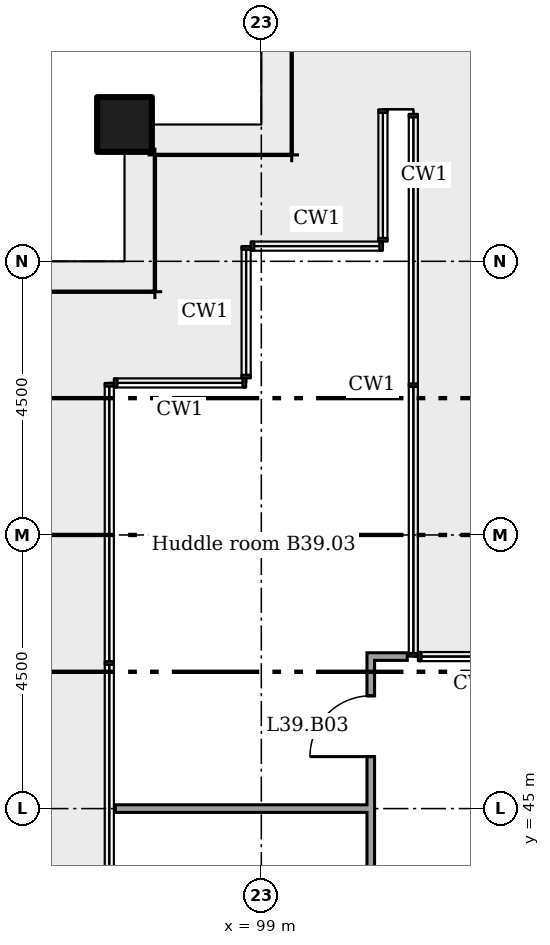
"""IFC4 building model, lengths in metres.
Left out: names, types, materials, properties, quantities, classifications, styles, units other than length and angle.
Written with IfcOpenShell. Run it as: python <this file> out.ifc"""

import sys

from ifc_helpers import new_model, si_unit, direction, frame, frame_2d, origin, origin_2d, place, context, subcontext, project, spatial, rectangle, extrude, element, fill, save


model = new_model("IFC4")
c1 = context("Model", 3, precision=1e-05, world=origin(), true_north=direction((0.0, 1.0)))
c2 = subcontext(c1, "Body", "Model", "MODEL_VIEW")
j1 = project(units=[si_unit("LENGTHUNIT", "METRE"), si_unit("PLANEANGLEUNIT", "RADIAN")], contexts=[c1])
p1 = place(None, origin())
s1 = spatial("IfcSite", under=j1, at=p1, CompositionType="ELEMENT")
p2 = place(p1, origin())
s2 = spatial("IfcBuilding", under=s1, at=p2, CompositionType="ELEMENT")
p3 = place(p2, frame((0.0, 0.0, 158.2)))
s3 = spatial("IfcBuildingStorey", under=s2, at=p3, CompositionType="ELEMENT", Elevation=158.2)
p4 = place(p3, frame((96.75, 56.25, 0.0)))
e1 = element("IfcColumn", 1, at=p4, inside=s3, PredefinedType="COLUMN", context=c2, shape_type="SweptSolid", body=[
    extrude(rectangle(XDim=0.9, YDim=0.9, at=origin_2d()), origin(), (0.0, 0.0, 1.0), 3.6),
])
p5 = place(p3, frame((96.6, 45.0, 0.0)))
e2 = element("IfcWall", 2, at=p5, inside=s3, PredefinedType="PARTITIONING", context=c2, shape_type="SweptSolid", body=[
    extrude(rectangle(XDim=4.2, YDim=0.125, at=frame_2d((2.1, 0.0))), origin(), (0.0, 0.0, 1.0), 2.851),
])
p6 = place(p3, frame((100.738, 47.5, 0.0)))
e3 = element("IfcWall", 3, at=p6, inside=s3, PredefinedType="PARTITIONING", context=c2, shape_type="SweptSolid", body=[
    extrude(rectangle(XDim=0.662, YDim=0.125, at=frame_2d((0.331, 0.0))), origin(), (0.0, 0.0, 1.0), 3.45),
])
p7 = place(p3, frame((100.8, 33.062, 0.0), z_axis=(0.0, 0.0, 1.0), x_axis=(0.0, 1.0, 0.0)))
e4 = element("IfcWall", 4, at=p7, inside=s3, PredefinedType="PARTITIONING", context=c2, shape_type="SweptSolid", body=[
    extrude(rectangle(XDim=14.375, YDim=0.125, at=frame_2d((7.188, 0.0))), origin(), (0.0, 0.0, 1.0), 3.45),
])
p8 = place(p7, frame((6.938, 0.0, 0.0)))
e5 = element("IfcOpeningElement", 5, at=p8, cuts=e4, PredefinedType="OPENING", context=c2, shape_type="SweptSolid", body=[
    extrude(rectangle(XDim=1.0, YDim=2.1, at=frame_2d((0.5, 1.05))), frame((0.0, 0.073, 0.0), z_axis=(0.0, -1.0, 0.0), x_axis=(1.0, 0.0, 0.0)), (0.0, 0.0, 1.0), 0.145),
])
p9 = place(p7, frame((12.792, 0.0, 0.0)))
e6 = element("IfcOpeningElement", 6, at=p9, cuts=e4, PredefinedType="OPENING", context=c2, shape_type="SweptSolid", body=[
    extrude(rectangle(XDim=1.0, YDim=2.1, at=frame_2d((0.5, 1.05))), frame((0.0, 0.073, 0.0), z_axis=(0.0, -1.0, 0.0), x_axis=(1.0, 0.0, 0.0)), (0.0, 0.0, 1.0), 0.145),
])
p10 = place(p9, origin())
e7 = element("IfcDoor", 7, at=p10, inside=s3, OperationType="SINGLE_SWING_RIGHT", PredefinedType="DOOR", context=c2, shape_type="SweptSolid", body=[
    extrude(rectangle(XDim=1.0, YDim=2.1, at=frame_2d((0.5, 1.05))), frame((0.0, 0.025, 0.0), z_axis=(0.0, -1.0, 0.0), x_axis=(1.0, 0.0, 0.0)), (0.0, 0.0, 1.0), 0.05),
])
fill(e6, e7)
save(model, sys.argv[1])
